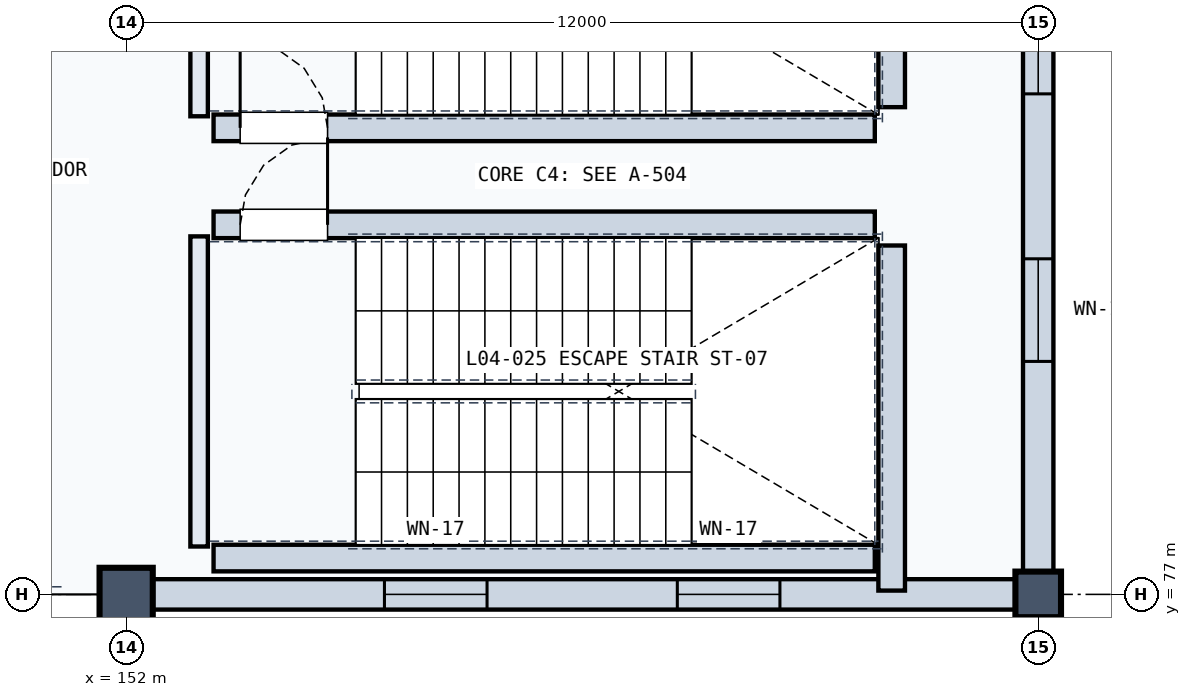
"""IFC4 building model, lengths in metres.
Left out: names, types, materials, properties, quantities, classifications, styles, units other than length and angle.
Written with IfcOpenShell. Run it as: python <this file> out.ifc"""

import sys

from ifc_helpers import new_model, si_unit, direction, frame, frame_2d, origin, origin_2d, place, context, subcontext, project, spatial, rectangle, extrude, element, fill, save


model = new_model("IFC4")
c1 = context("Model", 3, precision=1e-05, world=origin(), true_north=direction((0.0, 1.0)))
c2 = subcontext(c1, "Body", "Model", "MODEL_VIEW")
j1 = project(units=[si_unit("LENGTHUNIT", "METRE"), si_unit("PLANEANGLEUNIT", "RADIAN")], contexts=[c1])
p1 = place(None, origin())
s1 = spatial("IfcSite", under=j1, at=p1, CompositionType="ELEMENT")
p2 = place(p1, origin())
s2 = spatial("IfcBuilding", under=s1, at=p2, CompositionType="ELEMENT")
p3 = place(p2, frame((0.0, 0.0, 19.5)))
s3 = spatial("IfcBuildingStorey", under=s2, at=p3, CompositionType="ELEMENT", Elevation=19.5)
p4 = place(p3, frame((152.0, 77.0, 0.0), z_axis=(0.0, 0.0, 1.0), x_axis=(1.0, 0.0, 0.0)))
e1 = element("IfcColumn", 1, at=p4, inside=s3, PredefinedType="COLUMN", context=c2, shape_type="SweptSolid", body=[
    extrude(rectangle(XDim=0.7, YDim=0.7, at=origin_2d()), origin(), (0.0, 0.0, 1.0), 4.8),
])
p5 = place(p3, frame((164.0, 77.0, 0.0), z_axis=(0.0, 0.0, 1.0), x_axis=(1.0, 0.0, 0.0)))
e2 = element("IfcColumn", 2, at=p5, inside=s3, PredefinedType="COLUMN", context=c2, shape_type="SweptSolid", body=[
    extrude(rectangle(XDim=0.6, YDim=0.6, at=origin_2d()), origin(), (0.0, 0.0, 1.0), 4.8),
])
p6 = place(p3, frame((152.22, 77.0, 0.0), z_axis=(0.0, 0.0, 1.0), x_axis=(1.0, 0.0, 0.0)))
e3 = element("IfcWall", 3, at=p6, inside=s3, PredefinedType="SOLIDWALL", context=c2, shape_type="SweptSolid", body=[
    extrude(rectangle(XDim=11.56, YDim=0.4, at=frame_2d((5.78, 0.0))), origin(), (0.0, 0.0, 1.0), 3.64),
])
p7 = place(p6, frame((3.178, 0.0, 0.8)))
e4 = element("IfcOpeningElement", 4, at=p7, cuts=e3, PredefinedType="OPENING", context=c2, shape_type="SweptSolid", body=[
    extrude(rectangle(XDim=1.35, YDim=2.1, at=frame_2d((0.675, 1.05))), frame((0.0, 0.21, 0.0), z_axis=(0.0, -1.0, 0.0), x_axis=(1.0, 0.0, 0.0)), (0.0, 0.0, 1.0), 0.42),
])
p8 = place(p6, frame((7.032, 0.0, 0.8)))
e5 = element("IfcOpeningElement", 5, at=p8, cuts=e3, PredefinedType="OPENING", context=c2, shape_type="SweptSolid", body=[
    extrude(rectangle(XDim=1.35, YDim=2.1, at=frame_2d((0.675, 1.05))), frame((0.0, 0.21, 0.0), z_axis=(0.0, -1.0, 0.0), x_axis=(1.0, 0.0, 0.0)), (0.0, 0.0, 1.0), 0.42),
])
p9 = place(p3, frame((164.0, 77.22, 0.0), z_axis=(0.0, 0.0, 1.0), x_axis=(0.0, 1.0, 0.0)))
e6 = element("IfcWall", 6, at=p9, inside=s3, PredefinedType="SOLIDWALL", context=c2, shape_type="SweptSolid", body=[
    extrude(rectangle(XDim=10.56, YDim=0.4, at=frame_2d((5.28, 0.0))), origin(), (0.0, 0.0, 1.0), 3.79),
])
p10 = place(p9, frame((2.845, 0.0, 0.8)))
e7 = element("IfcOpeningElement", 7, at=p10, cuts=e6, PredefinedType="OPENING", context=c2, shape_type="SweptSolid", body=[
    extrude(rectangle(XDim=1.35, YDim=2.1, at=frame_2d((0.675, 1.05))), frame((0.0, 0.21, 0.0), z_axis=(0.0, -1.0, 0.0), x_axis=(1.0, 0.0, 0.0)), (0.0, 0.0, 1.0), 0.42),
])
p11 = place(p9, frame((6.365, 0.0, 0.8)))
e8 = element("IfcOpeningElement", 8, at=p11, cuts=e6, PredefinedType="OPENING", context=c2, shape_type="SweptSolid", body=[
    extrude(rectangle(XDim=1.35, YDim=2.1, at=frame_2d((0.675, 1.05))), frame((0.0, 0.21, 0.0), z_axis=(0.0, -1.0, 0.0), x_axis=(1.0, 0.0, 0.0)), (0.0, 0.0, 1.0), 0.42),
])
p12 = place(p3, frame((152.96, 77.63, 0.0), z_axis=(0.0, 0.0, 1.0), x_axis=(0.0, 1.0, 0.0)))
e9 = element("IfcWall", 9, at=p12, inside=s3, PredefinedType="SOLIDWALL", context=c2, shape_type="SweptSolid", body=[
    extrude(rectangle(XDim=4.08, YDim=0.23, at=frame_2d((2.04, 0.0))), origin(), (0.0, 0.0, 1.0), 4.46),
])
p13 = place(p3, frame((162.072, 77.05, 0.0), z_axis=(0.0, 0.0, 1.0), x_axis=(0.0, 1.0, 0.0)))
e10 = element("IfcWall", 10, at=p13, inside=s3, PredefinedType="SOLIDWALL", context=c2, shape_type="SweptSolid", body=[
    extrude(rectangle(XDim=4.54, YDim=0.35, at=frame_2d((2.27, 0.0))), origin(), (0.0, 0.0, 1.0), 4.46),
])
p14 = place(p3, frame((153.15, 77.478, 0.0), z_axis=(0.0, 0.0, 1.0), x_axis=(1.0, 0.0, 0.0)))
e11 = element("IfcWall", 11, at=p14, inside=s3, PredefinedType="SOLIDWALL", context=c2, shape_type="SweptSolid", body=[
    extrude(rectangle(XDim=8.7, YDim=0.35, at=frame_2d((4.35, 0.0))), origin(), (0.0, 0.0, 1.0), 4.46),
])
p15 = place(p3, frame((153.15, 81.862, 0.0), z_axis=(0.0, 0.0, 1.0), x_axis=(1.0, 0.0, 0.0)))
e12 = element("IfcWall", 12, at=p15, inside=s3, PredefinedType="SOLIDWALL", context=c2, shape_type="SweptSolid", body=[
    extrude(rectangle(XDim=8.7, YDim=0.35, at=frame_2d((4.35, 0.0))), origin(), (0.0, 0.0, 1.0), 4.46),
])
p16 = place(p15, frame((0.35, 0.0, 0.0)))
e13 = element("IfcOpeningElement", 13, at=p16, cuts=e12, PredefinedType="OPENING", context=c2, shape_type="SweptSolid", body=[
    extrude(rectangle(XDim=1.15, YDim=2.2, at=frame_2d((0.575, 1.1))), frame((0.0, 0.185, 0.0), z_axis=(0.0, -1.0, 0.0), x_axis=(1.0, 0.0, 0.0)), (0.0, 0.0, 1.0), 0.37),
])
p17 = place(p3, frame((152.96, 83.29, 0.0), z_axis=(0.0, 0.0, 1.0), x_axis=(0.0, 1.0, 0.0)))
e14 = element("IfcWall", 14, at=p17, inside=s3, PredefinedType="SOLIDWALL", context=c2, shape_type="SweptSolid", body=[
    extrude(rectangle(XDim=4.08, YDim=0.23, at=frame_2d((2.04, 0.0))), origin(), (0.0, 0.0, 1.0), 4.46),
])
p18 = place(p3, frame((162.072, 83.41, 0.0), z_axis=(0.0, 0.0, 1.0), x_axis=(0.0, 1.0, 0.0)))
e15 = element("IfcWall", 15, at=p18, inside=s3, PredefinedType="SOLIDWALL", context=c2, shape_type="SweptSolid", body=[
    extrude(rectangle(XDim=3.84, YDim=0.35, at=frame_2d((1.92, 0.0))), origin(), (0.0, 0.0, 1.0), 4.46),
])
p19 = place(p3, frame((153.15, 83.138, 0.0), z_axis=(0.0, 0.0, 1.0), x_axis=(1.0, 0.0, 0.0)))
e16 = element("IfcWall", 16, at=p19, inside=s3, PredefinedType="SOLIDWALL", context=c2, shape_type="SweptSolid", body=[
    extrude(rectangle(XDim=8.7, YDim=0.35, at=frame_2d((4.35, 0.0))), origin(), (0.0, 0.0, 1.0), 4.46),
])
p20 = place(p19, frame((0.35, 0.0, 0.0)))
e17 = element("IfcOpeningElement", 17, at=p20, cuts=e16, PredefinedType="OPENING", context=c2, shape_type="SweptSolid", body=[
    extrude(rectangle(XDim=1.15, YDim=2.2, at=frame_2d((0.575, 1.1))), frame((0.0, 0.185, 0.0), z_axis=(0.0, -1.0, 0.0), x_axis=(1.0, 0.0, 0.0)), (0.0, 0.0, 1.0), 0.37),
])
p21 = place(p7, origin())
e18 = element("IfcWindow", 18, at=p21, inside=s3, PartitioningType="SINGLE_PANEL", PredefinedType="WINDOW", context=c2, shape_type="SweptSolid", body=[
    extrude(rectangle(XDim=1.35, YDim=2.1, at=frame_2d((0.675, 1.05))), frame((0.0, 0.03, 0.0), z_axis=(0.0, -1.0, 0.0), x_axis=(1.0, 0.0, 0.0)), (0.0, 0.0, 1.0), 0.06),
])
fill(e4, e18)
p22 = place(p8, origin())
e19 = element("IfcWindow", 19, at=p22, inside=s3, PartitioningType="SINGLE_PANEL", PredefinedType="WINDOW", context=c2, shape_type="SweptSolid", body=[
    extrude(rectangle(XDim=1.35, YDim=2.1, at=frame_2d((0.675, 1.05))), frame((0.0, 0.03, 0.0), z_axis=(0.0, -1.0, 0.0), x_axis=(1.0, 0.0, 0.0)), (0.0, 0.0, 1.0), 0.06),
])
fill(e5, e19)
p23 = place(p10, origin())
e20 = element("IfcWindow", 20, at=p23, inside=s3, PartitioningType="SINGLE_PANEL", PredefinedType="WINDOW", context=c2, shape_type="SweptSolid", body=[
    extrude(rectangle(XDim=1.35, YDim=2.1, at=frame_2d((0.675, 1.05))), frame((0.0, 0.03, 0.0), z_axis=(0.0, -1.0, 0.0), x_axis=(1.0, 0.0, 0.0)), (0.0, 0.0, 1.0), 0.06),
])
fill(e7, e20)
p24 = place(p11, origin())
e21 = element("IfcWindow", 21, at=p24, inside=s3, PartitioningType="SINGLE_PANEL", PredefinedType="WINDOW", context=c2, shape_type="SweptSolid", body=[
    extrude(rectangle(XDim=1.35, YDim=2.1, at=frame_2d((0.675, 1.05))), frame((0.0, 0.03, 0.0), z_axis=(0.0, -1.0, 0.0), x_axis=(1.0, 0.0, 0.0)), (0.0, 0.0, 1.0), 0.06),
])
fill(e8, e21)
p25 = place(p16, origin())
e22 = element("IfcDoor", 22, at=p25, inside=s3, OperationType="SINGLE_SWING_RIGHT", PredefinedType="DOOR", context=c2, shape_type="SweptSolid", body=[
    extrude(rectangle(XDim=1.15, YDim=2.2, at=frame_2d((0.575, 1.1))), frame((0.0, 0.025, 0.0), z_axis=(0.0, -1.0, 0.0), x_axis=(1.0, 0.0, 0.0)), (0.0, 0.0, 1.0), 0.05),
])
fill(e13, e22)
p26 = place(p20, origin())
e23 = element("IfcDoor", 23, at=p26, inside=s3, OperationType="SINGLE_SWING_LEFT", PredefinedType="DOOR", context=c2, shape_type="SweptSolid", body=[
    extrude(rectangle(XDim=1.15, YDim=2.2, at=frame_2d((0.575, 1.1))), frame((0.0, 0.025, 0.0), z_axis=(0.0, -1.0, 0.0), x_axis=(1.0, 0.0, 0.0)), (0.0, 0.0, 1.0), 0.05),
])
fill(e17, e23)
save(model, sys.argv[1])
